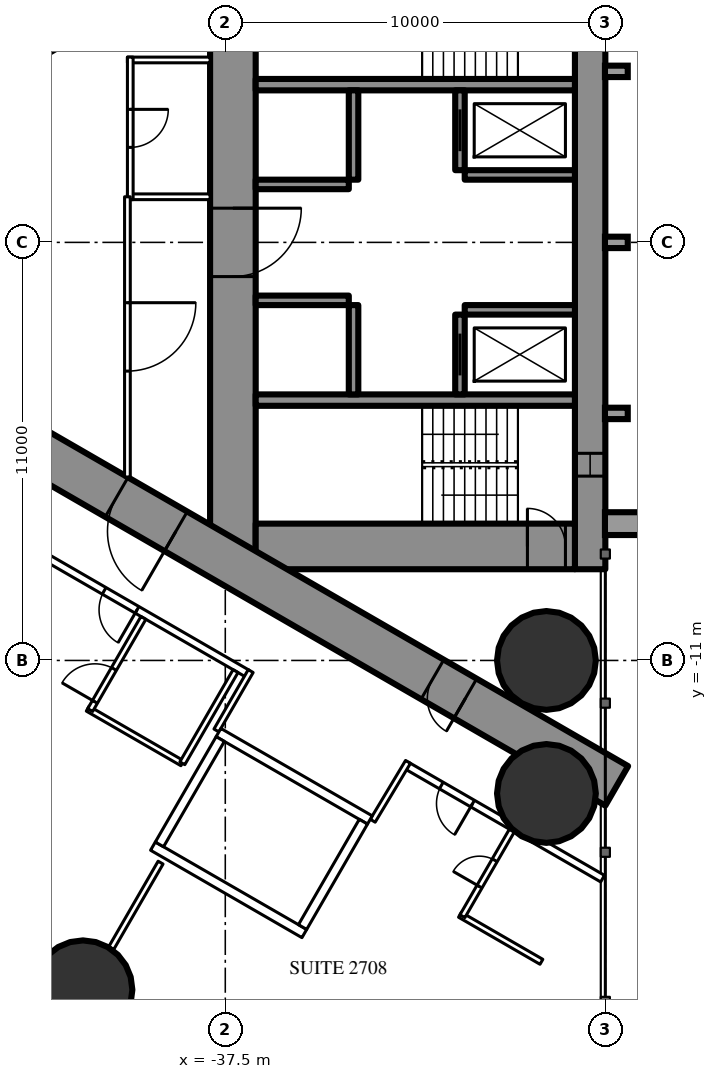
"""IFC4 building model, lengths in metres.
Left out: names, types, materials, properties, quantities, classifications, styles, units other than length and angle.
Written with IfcOpenShell. Run it as: python <this file> out.ifc"""

import sys

from ifc_helpers import new_model, si_unit, direction, frame, frame_2d, origin, origin_2d, place, context, subcontext, project, spatial, rectangle, hollow_circle, extrude, element, fill, save


model = new_model("IFC4")
c1 = context("Model", 3, precision=1e-05, world=origin(), true_north=direction((0.0, 1.0)))
c2 = subcontext(c1, "Body", "Model", "MODEL_VIEW")
j1 = project(units=[si_unit("LENGTHUNIT", "METRE"), si_unit("PLANEANGLEUNIT", "RADIAN")], contexts=[c1])
p1 = place(None, origin())
s1 = spatial("IfcSite", under=j1, at=p1, CompositionType="ELEMENT")
p2 = place(p1, origin())
s2 = spatial("IfcBuilding", under=s1, at=p2, CompositionType="ELEMENT")
p3 = place(p2, frame((0.0, 0.0, 104.6)))
s3 = spatial("IfcBuildingStorey", under=s2, at=p3, CompositionType="ELEMENT", Elevation=104.6)
for number, where, z_axis, x_axis in (
    (1, (-29.05, -11.0, 0.0), (0.0, 0.0, 1.0), (1.0, 0.0, 0.0)),
    (2, (-29.05, -14.5, 0.0), (0.0, 0.0, 1.0), (1.0, 0.0, 0.0)),
    (3, (-41.245, -19.666, 0.0), (0.0, 0.0, 1.0), (1.0, 0.0, 0.0)),
):
    element("IfcColumn", number, at=place(p3, frame(where, z_axis=z_axis, x_axis=x_axis)), inside=s3, PredefinedType="COLUMN", context=c2, shape_type="SweptSolid", body=[
        extrude(hollow_circle(Radius=1.3, WallThickness=0.1, at=origin_2d()), origin(), (0.0, 0.0, 1.0), 3.5),
    ])
p4 = place(p3, frame((-27.9, 8.6, 0.0), z_axis=(0.0, 0.0, 1.0), x_axis=(0.0, -1.0, 0.0)))
e4 = element("IfcWall", 4, at=p4, inside=s3, PredefinedType="SHEAR", context=c2, shape_type="SweptSolid", body=[
    extrude(rectangle(XDim=17.2, YDim=0.8, at=frame_2d((8.6, 0.0))), origin(), (0.0, 0.0, 1.0), 3.5),
])
p5 = place(p4, frame((2.45, 0.0, 0.6)))
e5 = element("IfcOpeningElement", 5, at=p5, cuts=e4, PredefinedType="OPENING", context=c2, shape_type="SweptSolid", body=[
    extrude(rectangle(XDim=0.6, YDim=2.1, at=frame_2d((0.3, 1.05))), frame((0.0, 0.41, 0.0), z_axis=(0.0, -1.0, 0.0), x_axis=(1.0, 0.0, 0.0)), (0.0, 0.0, 1.0), 0.82),
])
p6 = place(p4, frame((14.15, 0.0, 0.6)))
e6 = element("IfcOpeningElement", 6, at=p6, cuts=e4, PredefinedType="OPENING", context=c2, shape_type="SweptSolid", body=[
    extrude(rectangle(XDim=0.6, YDim=2.1, at=frame_2d((0.3, 1.05))), frame((0.0, 0.41, 0.0), z_axis=(0.0, -1.0, 0.0), x_axis=(1.0, 0.0, 0.0)), (0.0, 0.0, 1.0), 0.82),
])
p7 = place(p3, frame((-37.3, 8.6, 0.0), z_axis=(0.0, 0.0, 1.0), x_axis=(0.0, -1.0, 0.0)))
e7 = element("IfcWall", 7, at=p7, inside=s3, PredefinedType="SHEAR", context=c2, shape_type="SweptSolid", body=[
    extrude(rectangle(XDim=17.2, YDim=1.2, at=frame_2d((8.6, 0.0))), origin(), (0.0, 0.0, 1.0), 3.5),
])
p8 = place(p7, frame((7.7, 0.0, 0.0)))
e8 = element("IfcOpeningElement", 8, at=p8, cuts=e7, PredefinedType="OPENING", context=c2, shape_type="SweptSolid", body=[
    extrude(rectangle(XDim=1.8, YDim=2.2, at=frame_2d((0.9, 1.1))), frame((0.0, 0.61, 0.0), z_axis=(0.0, -1.0, 0.0), x_axis=(1.0, 0.0, 0.0)), (0.0, 0.0, 1.0), 1.22),
])
p9 = place(p3, frame((-28.3, -8.0, 0.0), z_axis=(0.0, 0.0, 1.0), x_axis=(-1.0, 0.0, 0.0)))
e9 = element("IfcWall", 9, at=p9, inside=s3, PredefinedType="SHEAR", context=c2, shape_type="SweptSolid", body=[
    extrude(rectangle(XDim=8.4, YDim=1.2, at=frame_2d((4.2, 0.0))), origin(), (0.0, 0.0, 1.0), 3.5),
])
p10 = place(p9, frame((0.25, 0.0, 0.0)))
e10 = element("IfcOpeningElement", 10, at=p10, cuts=e9, PredefinedType="OPENING", context=c2, shape_type="SweptSolid", body=[
    extrude(rectangle(XDim=1.0, YDim=2.2, at=frame_2d((0.5, 1.1))), frame((0.0, 0.61, 0.0), z_axis=(0.0, -1.0, 0.0), x_axis=(1.0, 0.0, 0.0)), (0.0, 0.0, 1.0), 1.22),
])
for number, where, z_axis, x_axis in (
    (11, (-28.3, 4.15, 0.0), (0.0, 0.0, 1.0), (-1.0, 0.0, 0.0)),
    (12, (-28.3, -4.15, 0.0), (0.0, 0.0, 1.0), (-1.0, 0.0, 0.0)),
):
    element("IfcWall", number, at=place(p3, frame(where, z_axis=z_axis, x_axis=x_axis)), inside=s3, PredefinedType="SHEAR", context=c2, shape_type="SweptSolid", body=[
        extrude(rectangle(XDim=8.4, YDim=0.3, at=frame_2d((4.2, 0.0))), origin(), (0.0, 0.0, 1.0), 3.5),
    ])
p11 = place(p3, frame((-31.325, 4.0, 0.0), z_axis=(0.0, 0.0, 1.0), x_axis=(0.0, -1.0, 0.0)))
e13 = element("IfcWall", 13, at=p11, inside=s3, PredefinedType="SHEAR", context=c2, shape_type="SweptSolid", body=[
    extrude(rectangle(XDim=2.1, YDim=0.25, at=frame_2d((1.05, 0.0))), origin(), (0.0, 0.0, 1.0), 3.5),
])
p12 = place(p11, frame((0.5, 0.0, 0.0)))
e14 = element("IfcOpeningElement", 14, at=p12, cuts=e13, PredefinedType="OPENING", context=c2, shape_type="SweptSolid", body=[
    extrude(rectangle(XDim=1.1, YDim=2.2, at=frame_2d((0.55, 1.1))), frame((0.0, 0.135, 0.0), z_axis=(0.0, -1.0, 0.0), x_axis=(1.0, 0.0, 0.0)), (0.0, 0.0, 1.0), 0.27),
])
p13 = place(p3, frame((-34.125, 4.0, 0.0), z_axis=(0.0, 0.0, 1.0), x_axis=(0.0, -1.0, 0.0)))
e15 = element("IfcWall", 15, at=p13, inside=s3, PredefinedType="SHEAR", context=c2, shape_type="SweptSolid", body=[
    extrude(rectangle(XDim=2.35, YDim=0.25, at=frame_2d((1.175, 0.0))), origin(), (0.0, 0.0, 1.0), 3.5),
])
p14 = place(p3, frame((-28.3, 1.775, 0.0), z_axis=(0.0, 0.0, 1.0), x_axis=(-1.0, 0.0, 0.0)))
e16 = element("IfcWall", 16, at=p14, inside=s3, PredefinedType="SHEAR", context=c2, shape_type="SweptSolid", body=[
    extrude(rectangle(XDim=2.9, YDim=0.25, at=frame_2d((1.45, 0.0))), origin(), (0.0, 0.0, 1.0), 3.5),
])
p15 = place(p3, frame((-34.25, 1.525, 0.0), z_axis=(0.0, 0.0, 1.0), x_axis=(-1.0, 0.0, 0.0)))
e17 = element("IfcWall", 17, at=p15, inside=s3, PredefinedType="SHEAR", context=c2, shape_type="SweptSolid", body=[
    extrude(rectangle(XDim=2.45, YDim=0.25, at=frame_2d((1.225, 0.0))), origin(), (0.0, 0.0, 1.0), 3.5),
])
p16 = place(p3, frame((-31.325, -1.9, 0.0), z_axis=(0.0, 0.0, 1.0), x_axis=(0.0, -1.0, 0.0)))
e18 = element("IfcWall", 18, at=p16, inside=s3, PredefinedType="SHEAR", context=c2, shape_type="SweptSolid", body=[
    extrude(rectangle(XDim=2.1, YDim=0.25, at=frame_2d((1.05, 0.0))), origin(), (0.0, 0.0, 1.0), 3.5),
])
p17 = place(p16, frame((0.5, 0.0, 0.0)))
e19 = element("IfcOpeningElement", 19, at=p17, cuts=e18, PredefinedType="OPENING", context=c2, shape_type="SweptSolid", body=[
    extrude(rectangle(XDim=1.1, YDim=2.2, at=frame_2d((0.55, 1.1))), frame((0.0, 0.135, 0.0), z_axis=(0.0, -1.0, 0.0), x_axis=(1.0, 0.0, 0.0)), (0.0, 0.0, 1.0), 0.27),
])
p18 = place(p3, frame((-34.125, -1.65, 0.0), z_axis=(0.0, 0.0, 1.0), x_axis=(0.0, -1.0, 0.0)))
e20 = element("IfcWall", 20, at=p18, inside=s3, PredefinedType="SHEAR", context=c2, shape_type="SweptSolid", body=[
    extrude(rectangle(XDim=2.35, YDim=0.25, at=frame_2d((1.175, 0.0))), origin(), (0.0, 0.0, 1.0), 3.5),
])
p19 = place(p3, frame((-28.3, -1.775, 0.0), z_axis=(0.0, 0.0, 1.0), x_axis=(-1.0, 0.0, 0.0)))
e21 = element("IfcWall", 21, at=p19, inside=s3, PredefinedType="SHEAR", context=c2, shape_type="SweptSolid", body=[
    extrude(rectangle(XDim=2.9, YDim=0.25, at=frame_2d((1.45, 0.0))), origin(), (0.0, 0.0, 1.0), 3.5),
])
p20 = place(p3, frame((-34.25, -1.525, 0.0), z_axis=(0.0, 0.0, 1.0), x_axis=(-1.0, 0.0, 0.0)))
e22 = element("IfcWall", 22, at=p20, inside=s3, PredefinedType="SHEAR", context=c2, shape_type="SweptSolid", body=[
    extrude(rectangle(XDim=2.45, YDim=0.25, at=frame_2d((1.225, 0.0))), origin(), (0.0, 0.0, 1.0), 3.5),
])
p21 = place(p3, frame((-27.2, 14.3, 0.0), z_axis=(0.0, 0.0, 1.0), x_axis=(-0.866026593062, -0.499997940104, 0.0)))
e23 = element("IfcWall", 23, at=p21, inside=s3, PredefinedType="SHEAR", context=c2, shape_type="SweptSolid", body=[
    extrude(rectangle(XDim=28.946, YDim=1.2, at=frame_2d((14.473, 0.0))), origin(), (0.0, 0.0, 1.0), 3.5),
])
p22 = place(p21, frame((4.6, 0.0, 0.0)))
e24 = element("IfcOpeningElement", 24, at=p22, cuts=e23, PredefinedType="OPENING", context=c2, shape_type="SweptSolid", body=[
    extrude(rectangle(XDim=1.0, YDim=2.2, at=frame_2d((0.5, 1.1))), frame((0.0, 0.61, 0.0), z_axis=(0.0, -1.0, 0.0), x_axis=(1.0, 0.0, 0.0)), (0.0, 0.0, 1.0), 1.22),
])
p23 = place(p21, frame((13.395, 0.0, 0.0)))
e25 = element("IfcOpeningElement", 25, at=p23, cuts=e23, PredefinedType="OPENING", context=c2, shape_type="SweptSolid", body=[
    extrude(rectangle(XDim=1.8, YDim=2.2, at=frame_2d((0.9, 1.1))), frame((0.0, 0.61, 0.0), z_axis=(0.0, -1.0, 0.0), x_axis=(1.0, 0.0, 0.0)), (0.0, 0.0, 1.0), 1.22),
])
p24 = place(p3, frame((-27.2, -14.3, 0.0), z_axis=(0.0, 0.0, 1.0), x_axis=(-0.866024021859, 0.500002393557, 0.0)))
e26 = element("IfcWall", 26, at=p24, inside=s3, PredefinedType="SHEAR", context=c2, shape_type="SweptSolid", body=[
    extrude(rectangle(XDim=27.907, YDim=1.2, at=frame_2d((13.954, 0.0))), origin(), (0.0, 0.0, 1.0), 3.5),
])
p25 = place(p24, frame((4.6, 0.0, 0.0)))
e27 = element("IfcOpeningElement", 27, at=p25, cuts=e26, PredefinedType="OPENING", context=c2, shape_type="SweptSolid", body=[
    extrude(rectangle(XDim=1.0, YDim=2.2, at=frame_2d((0.5, 1.1))), frame((0.0, 0.61, 0.0), z_axis=(0.0, -1.0, 0.0), x_axis=(1.0, 0.0, 0.0)), (0.0, 0.0, 1.0), 1.22),
])
p26 = place(p24, frame((13.395, 0.0, 0.0)))
e28 = element("IfcOpeningElement", 28, at=p26, cuts=e26, PredefinedType="OPENING", context=c2, shape_type="SweptSolid", body=[
    extrude(rectangle(XDim=1.8, YDim=2.2, at=frame_2d((0.9, 1.1))), frame((0.0, 0.61, 0.0), z_axis=(0.0, -1.0, 0.0), x_axis=(1.0, 0.0, 0.0)), (0.0, 0.0, 1.0), 1.22),
])
p27 = place(p3, frame((-39.202, -16.32, 0.0), z_axis=(0.0, 0.0, 1.0), x_axis=(-0.49997716683, -0.86603858612, 0.0)))
e29 = element("IfcWall", 29, at=p27, inside=s3, PredefinedType="PARTITIONING", context=c2, shape_type="SweptSolid", body=[
    extrude(rectangle(XDim=2.6, YDim=0.15, at=frame_2d((1.3, 0.0))), origin(), (0.0, 0.0, 1.0), 3.25),
])
p28 = place(p3, frame((-27.572, -16.741, 0.0), z_axis=(0.0, 0.0, 1.0), x_axis=(-0.866024464444, 0.500001626982, 0.0)))
e30 = element("IfcWall", 30, at=p28, inside=s3, PredefinedType="PARTITIONING", context=c2, shape_type="SweptSolid", body=[
    extrude(rectangle(XDim=5.955, YDim=0.2, at=frame_2d((2.978, 0.0))), origin(), (0.0, 0.0, 1.0), 3.25),
])
p29 = place(p28, frame((3.95, 0.0, 0.0)))
e31 = element("IfcOpeningElement", 31, at=p29, cuts=e30, PredefinedType="OPENING", context=c2, shape_type="SweptSolid", body=[
    extrude(rectangle(XDim=0.95, YDim=2.2, at=frame_2d((0.475, 1.1))), frame((0.0, 0.11, 0.0), z_axis=(0.0, -1.0, 0.0), x_axis=(1.0, 0.0, 0.0)), (0.0, 0.0, 1.0), 0.22),
])
p30 = place(p3, frame((-36.92, -11.344, 0.0), z_axis=(0.0, 0.0, 1.0), x_axis=(-0.866028313256, 0.499994960614, 0.0)))
e32 = element("IfcWall", 32, at=p30, inside=s3, PredefinedType="PARTITIONING", context=c2, shape_type="SweptSolid", body=[
    extrude(rectangle(XDim=22.568, YDim=0.2, at=frame_2d((11.284, 0.0))), origin(), (0.0, 0.0, 1.0), 3.25),
])
p31 = place(p30, frame((21.018, 0.0, 0.0)))
e33 = element("IfcOpeningElement", 33, at=p31, cuts=e32, PredefinedType="OPENING", context=c2, shape_type="SweptSolid", body=[
    extrude(rectangle(XDim=0.95, YDim=2.2, at=frame_2d((0.475, 1.1))), frame((0.0, 0.11, 0.0), z_axis=(0.0, -1.0, 0.0), x_axis=(1.0, 0.0, 0.0)), (0.0, 0.0, 1.0), 0.22),
])
p32 = place(p30, frame((3.35, 0.0, 0.0)))
e34 = element("IfcOpeningElement", 34, at=p32, cuts=e32, PredefinedType="OPENING", context=c2, shape_type="SweptSolid", body=[
    extrude(rectangle(XDim=1.0, YDim=2.2, at=frame_2d((0.5, 1.1))), frame((0.0, 0.11, 0.0), z_axis=(0.0, -1.0, 0.0), x_axis=(1.0, 0.0, 0.0)), (0.0, 0.0, 1.0), 0.22),
])
p33 = place(p3, frame((-36.831, -11.28, 0.0), z_axis=(0.0, 0.0, 1.0), x_axis=(-0.499937177781, -0.866061671171, 0.0)))
e35 = element("IfcWall", 35, at=p33, inside=s3, PredefinedType="PARTITIONING", context=c2, shape_type="SweptSolid", body=[
    extrude(rectangle(XDim=1.804, YDim=0.15, at=frame_2d((0.902, 0.0))), origin(), (0.0, 0.0, 1.0), 3.25),
])
p34 = place(p3, frame((-33.621, -15.218, 0.0), z_axis=(0.0, 0.0, 1.0), x_axis=(0.514336634837, 0.857588377991, 0.0)))
e36 = element("IfcWall", 36, at=p34, inside=s3, PredefinedType="PARTITIONING", context=c2, shape_type="SweptSolid", body=[
    extrude(rectangle(XDim=1.805, YDim=0.15, at=frame_2d((0.903, 0.0))), origin(), (0.0, 0.0, 1.0), 3.25),
])
p35 = place(p3, frame((-38.63, -13.705, 0.0), z_axis=(0.0, 0.0, 1.0), x_axis=(-0.866018712932, 0.500011588718, 0.0)))
e37 = element("IfcWall", 37, at=p35, inside=s3, PredefinedType="PARTITIONING", context=c2, shape_type="SweptSolid", body=[
    extrude(rectangle(XDim=2.875, YDim=0.15, at=frame_2d((1.438, 0.0))), origin(), (0.0, 0.0, 1.0), 3.25),
])
p36 = place(p3, frame((-39.655, -9.88, 0.0), z_axis=(0.0, 0.0, 1.0), x_axis=(-0.500049511043, -0.865996816683, 0.0)))
e38 = element("IfcWall", 38, at=p36, inside=s3, PredefinedType="PARTITIONING", context=c2, shape_type="SweptSolid", body=[
    extrude(rectangle(XDim=2.8, YDim=0.15, at=frame_2d((1.4, 0.0))), origin(), (0.0, 0.0, 1.0), 3.25),
])
p37 = place(p36, frame((1.55, 0.0, 0.0)))
e39 = element("IfcOpeningElement", 39, at=p37, cuts=e38, PredefinedType="OPENING", context=c2, shape_type="SweptSolid", body=[
    extrude(rectangle(XDim=1.0, YDim=2.2, at=frame_2d((0.5, 1.1))), frame((0.0, 0.085, 0.0), z_axis=(0.0, -1.0, 0.0), x_axis=(1.0, 0.0, 0.0)), (0.0, 0.0, 1.0), 0.17),
])
p38 = place(p3, frame((-37.23, -11.281, 0.0), z_axis=(0.0, 0.0, 1.0), x_axis=(-0.500049511043, -0.865996816683, 0.0)))
e40 = element("IfcWall", 40, at=p38, inside=s3, PredefinedType="PARTITIONING", context=c2, shape_type="SweptSolid", body=[
    extrude(rectangle(XDim=2.8, YDim=0.15, at=frame_2d((1.4, 0.0))), origin(), (0.0, 0.0, 1.0), 3.25),
])
p39 = place(p3, frame((-29.182, -18.929, 0.0), z_axis=(0.0, 0.0, 1.0), x_axis=(-0.866006523861, 0.500032699561, 0.0)))
e41 = element("IfcWall", 41, at=p39, inside=s3, PredefinedType="PARTITIONING", context=c2, shape_type="SweptSolid", body=[
    extrude(rectangle(XDim=2.475, YDim=0.15, at=frame_2d((1.237, 0.0))), origin(), (0.0, 0.0, 1.0), 3.25),
])
p40 = place(p3, frame((-29.96, -15.478, 0.0), z_axis=(0.0, 0.0, 1.0), x_axis=(-0.500006934395, -0.866021400173, 0.0)))
e42 = element("IfcWall", 42, at=p40, inside=s3, PredefinedType="PARTITIONING", context=c2, shape_type="SweptSolid", body=[
    extrude(rectangle(XDim=2.6, YDim=0.15, at=frame_2d((1.3, 0.0))), origin(), (0.0, 0.0, 1.0), 3.25),
])
p41 = place(p40, frame((0.9, 0.0, 0.0)))
e43 = element("IfcOpeningElement", 43, at=p41, cuts=e42, PredefinedType="OPENING", context=c2, shape_type="SweptSolid", body=[
    extrude(rectangle(XDim=0.8, YDim=2.2, at=frame_2d((0.4, 1.1))), frame((0.0, 0.085, 0.0), z_axis=(0.0, -1.0, 0.0), x_axis=(1.0, 0.0, 0.0)), (0.0, 0.0, 1.0), 0.17),
])
for number, where, z_axis, x_axis in (
    (44, (-37.9, 1.2, 0.0), (0.0, 0.0, 1.0), (-1.0, 0.0, 0.0)),
    (45, (-37.9, 4.8, 0.0), (0.0, 0.0, 1.0), (-1.0, 0.0, 0.0)),
):
    element("IfcWall", number, at=place(p3, frame(where, z_axis=z_axis, x_axis=x_axis)), inside=s3, PredefinedType="PARTITIONING", context=c2, shape_type="SweptSolid", body=[
        extrude(rectangle(XDim=2.175, YDim=0.15, at=frame_2d((1.087, 0.0))), origin(), (0.0, 0.0, 1.0), 3.25),
    ])
p42 = place(p3, frame((-40.0, 4.875, 0.0), z_axis=(0.0, 0.0, 1.0), x_axis=(0.0, -1.0, 0.0)))
e46 = element("IfcWall", 46, at=p42, inside=s3, PredefinedType="PARTITIONING", context=c2, shape_type="SweptSolid", body=[
    extrude(rectangle(XDim=3.75, YDim=0.15, at=frame_2d((1.875, 0.0))), origin(), (0.0, 0.0, 1.0), 3.25),
])
p43 = place(p42, frame((1.375, 0.0, 0.0)))
e47 = element("IfcOpeningElement", 47, at=p43, cuts=e46, PredefinedType="OPENING", context=c2, shape_type="SweptSolid", body=[
    extrude(rectangle(XDim=1.0, YDim=2.2, at=frame_2d((0.5, 1.1))), frame((0.0, 0.085, 0.0), z_axis=(0.0, -1.0, 0.0), x_axis=(1.0, 0.0, 0.0)), (0.0, 0.0, 1.0), 0.17),
])
p44 = place(p3, frame((-40.075, 1.2, 0.0), z_axis=(0.0, 0.0, 1.0), x_axis=(0.0, -1.0, 0.0)))
e48 = element("IfcWall", 48, at=p44, inside=s3, PredefinedType="PARTITIONING", context=c2, shape_type="SweptSolid", body=[
    extrude(rectangle(XDim=7.374, YDim=0.15, at=frame_2d((3.687, 0.0))), origin(), (0.0, 0.0, 1.0), 3.25),
])
p45 = place(p44, frame((2.787, 0.0, 0.0)))
e49 = element("IfcOpeningElement", 49, at=p45, cuts=e48, PredefinedType="OPENING", context=c2, shape_type="SweptSolid", body=[
    extrude(rectangle(XDim=1.8, YDim=2.2, at=frame_2d((0.9, 1.1))), frame((0.0, 0.085, 0.0), z_axis=(0.0, -1.0, 0.0), x_axis=(1.0, 0.0, 0.0)), (0.0, 0.0, 1.0), 0.17),
])
p46 = place(p3, frame((-33.696, -15.197, 0.0), z_axis=(0.0, 0.0, 1.0), x_axis=(-0.865976953817, 0.500083908417, 0.0)))
e50 = element("IfcWall", 50, at=p46, inside=s3, PredefinedType="PARTITIONING", context=c2, shape_type="SweptSolid", body=[
    extrude(rectangle(XDim=4.599, YDim=0.25, at=frame_2d((2.3, 0.0))), origin(), (0.0, 0.0, 1.0), 3.25),
])
p47 = place(p3, frame((-35.42, -18.186, 0.0), z_axis=(0.0, 0.0, 1.0), x_axis=(-0.865990227814, 0.50006092162, 0.0)))
e51 = element("IfcWall", 51, at=p47, inside=s3, PredefinedType="PARTITIONING", context=c2, shape_type="SweptSolid", body=[
    extrude(rectangle(XDim=4.6, YDim=0.25, at=frame_2d((2.3, 0.0))), origin(), (0.0, 0.0, 1.0), 3.25),
])
p48 = place(p3, frame((-33.866, -15.243, 0.0), z_axis=(0.0, 0.0, 1.0), x_axis=(-0.499929347863, -0.866066190972, 0.0)))
e52 = element("IfcWall", 52, at=p48, inside=s3, PredefinedType="PARTITIONING", context=c2, shape_type="SweptSolid", body=[
    extrude(rectangle(XDim=3.201, YDim=0.25, at=frame_2d((1.6, 0.0))), origin(), (0.0, 0.0, 1.0), 3.25),
])
p49 = place(p3, frame((-37.633, -13.068, 0.0), z_axis=(0.0, 0.0, 1.0), x_axis=(-0.499872130319, -0.866099216793, 0.0)))
e53 = element("IfcWall", 53, at=p49, inside=s3, PredefinedType="PARTITIONING", context=c2, shape_type="SweptSolid", body=[
    extrude(rectangle(XDim=3.2, YDim=0.25, at=frame_2d((1.6, 0.0))), origin(), (0.0, 0.0, 1.0), 3.25),
])
p50 = place(p37, origin())
e54 = element("IfcDoor", 54, at=p50, inside=s3, OperationType="SINGLE_SWING_RIGHT", PredefinedType="DOOR", context=c2, shape_type="SweptSolid", body=[
    extrude(rectangle(XDim=1.0, YDim=2.2, at=frame_2d((0.5, 1.1))), frame((0.0, 0.025, 0.0), z_axis=(0.0, -1.0, 0.0), x_axis=(1.0, 0.0, 0.0)), (0.0, 0.0, 1.0), 0.05),
])
fill(e39, e54)
p51 = place(p32, origin())
e55 = element("IfcDoor", 55, at=p51, inside=s3, OperationType="SINGLE_SWING_LEFT", PredefinedType="DOOR", context=c2, shape_type="SweptSolid", body=[
    extrude(rectangle(XDim=1.0, YDim=2.2, at=frame_2d((0.5, 1.1))), frame((0.0, 0.025, 0.0), z_axis=(0.0, -1.0, 0.0), x_axis=(1.0, 0.0, 0.0)), (0.0, 0.0, 1.0), 0.05),
])
fill(e34, e55)
p52 = place(p41, origin())
e56 = element("IfcDoor", 56, at=p52, inside=s3, OperationType="SINGLE_SWING_RIGHT", PredefinedType="DOOR", context=c2, shape_type="SweptSolid", body=[
    extrude(rectangle(XDim=0.8, YDim=2.2, at=frame_2d((0.4, 1.1))), frame((0.0, 0.025, 0.0), z_axis=(0.0, -1.0, 0.0), x_axis=(1.0, 0.0, 0.0)), (0.0, 0.0, 1.0), 0.05),
])
fill(e43, e56)
p53 = place(p29, origin())
e57 = element("IfcDoor", 57, at=p53, inside=s3, OperationType="SINGLE_SWING_LEFT", PredefinedType="DOOR", context=c2, shape_type="SweptSolid", body=[
    extrude(rectangle(XDim=0.95, YDim=2.2, at=frame_2d((0.475, 1.1))), frame((0.0, 0.025, 0.0), z_axis=(0.0, -1.0, 0.0), x_axis=(1.0, 0.0, 0.0)), (0.0, 0.0, 1.0), 0.05),
])
fill(e31, e57)
p54 = place(p43, origin())
e58 = element("IfcDoor", 58, at=p54, inside=s3, OperationType="SINGLE_SWING_LEFT", PredefinedType="DOOR", context=c2, shape_type="SweptSolid", body=[
    extrude(rectangle(XDim=1.0, YDim=2.2, at=frame_2d((0.5, 1.1))), frame((0.0, 0.025, 0.0), z_axis=(0.0, -1.0, 0.0), x_axis=(1.0, 0.0, 0.0)), (0.0, 0.0, 1.0), 0.05),
])
fill(e47, e58)
p55 = place(p45, origin())
e59 = element("IfcDoor", 59, at=p55, inside=s3, OperationType="DOUBLE_DOOR_SINGLE_SWING", PredefinedType="DOOR", context=c2, shape_type="SweptSolid", body=[
    extrude(rectangle(XDim=1.8, YDim=2.2, at=frame_2d((0.9, 1.1))), frame((0.0, 0.025, 0.0), z_axis=(0.0, -1.0, 0.0), x_axis=(1.0, 0.0, 0.0)), (0.0, 0.0, 1.0), 0.05),
])
fill(e49, e59)
p56 = place(p25, origin())
e60 = element("IfcDoor", 60, at=p56, inside=s3, OperationType="SINGLE_SWING_LEFT", PredefinedType="DOOR", context=c2, shape_type="SweptSolid", body=[
    extrude(rectangle(XDim=1.0, YDim=2.2, at=frame_2d((0.5, 1.1))), frame((0.0, 0.025, 0.0), z_axis=(0.0, -1.0, 0.0), x_axis=(1.0, 0.0, 0.0)), (0.0, 0.0, 1.0), 0.05),
])
fill(e27, e60)
p57 = place(p26, origin())
e61 = element("IfcDoor", 61, at=p57, inside=s3, OperationType="DOUBLE_DOOR_SINGLE_SWING", PredefinedType="DOOR", context=c2, shape_type="SweptSolid", body=[
    extrude(rectangle(XDim=1.8, YDim=2.2, at=frame_2d((0.9, 1.1))), frame((0.0, 0.025, 0.0), z_axis=(0.0, -1.0, 0.0), x_axis=(1.0, 0.0, 0.0)), (0.0, 0.0, 1.0), 0.05),
])
fill(e28, e61)
p58 = place(p8, origin())
e62 = element("IfcDoor", 62, at=p58, inside=s3, OperationType="DOUBLE_DOOR_SINGLE_SWING", PredefinedType="DOOR", context=c2, shape_type="SweptSolid", body=[
    extrude(rectangle(XDim=1.8, YDim=2.2, at=frame_2d((0.9, 1.1))), frame((0.0, 0.025, 0.0), z_axis=(0.0, -1.0, 0.0), x_axis=(1.0, 0.0, 0.0)), (0.0, 0.0, 1.0), 0.05),
])
fill(e8, e62)
p59 = place(p10, origin())
e63 = element("IfcDoor", 63, at=p59, inside=s3, OperationType="SINGLE_SWING_RIGHT", PredefinedType="DOOR", context=c2, shape_type="SweptSolid", body=[
    extrude(rectangle(XDim=1.0, YDim=2.2, at=frame_2d((0.5, 1.1))), frame((0.0, 0.025, 0.0), z_axis=(0.0, -1.0, 0.0), x_axis=(1.0, 0.0, 0.0)), (0.0, 0.0, 1.0), 0.05),
])
fill(e10, e63)
p60 = place(p12, origin())
e64 = element("IfcDoor", 64, at=p60, inside=s3, OperationType="SLIDING_TO_LEFT", PredefinedType="USERDEFINED", context=c2, shape_type="SweptSolid", body=[
    extrude(rectangle(XDim=1.1, YDim=2.2, at=frame_2d((0.55, 1.1))), frame((0.0, 0.025, 0.0), z_axis=(0.0, -1.0, 0.0), x_axis=(1.0, 0.0, 0.0)), (0.0, 0.0, 1.0), 0.05),
])
fill(e14, e64)
p61 = place(p17, origin())
e65 = element("IfcDoor", 65, at=p61, inside=s3, OperationType="SLIDING_TO_LEFT", PredefinedType="USERDEFINED", context=c2, shape_type="SweptSolid", body=[
    extrude(rectangle(XDim=1.1, YDim=2.2, at=frame_2d((0.55, 1.1))), frame((0.0, 0.025, 0.0), z_axis=(0.0, -1.0, 0.0), x_axis=(1.0, 0.0, 0.0)), (0.0, 0.0, 1.0), 0.05),
])
fill(e19, e65)
p62 = place(p6, origin())
e66 = element("IfcWindow", 66, at=p62, inside=s3, PartitioningType="SINGLE_PANEL", PredefinedType="WINDOW", context=c2, shape_type="SweptSolid", body=[
    extrude(rectangle(XDim=0.6, YDim=2.1, at=frame_2d((0.3, 1.05))), frame((0.0, 0.03, 0.0), z_axis=(0.0, -1.0, 0.0), x_axis=(1.0, 0.0, 0.0)), (0.0, 0.0, 1.0), 0.06),
])
fill(e6, e66)
save(model, sys.argv[1])
